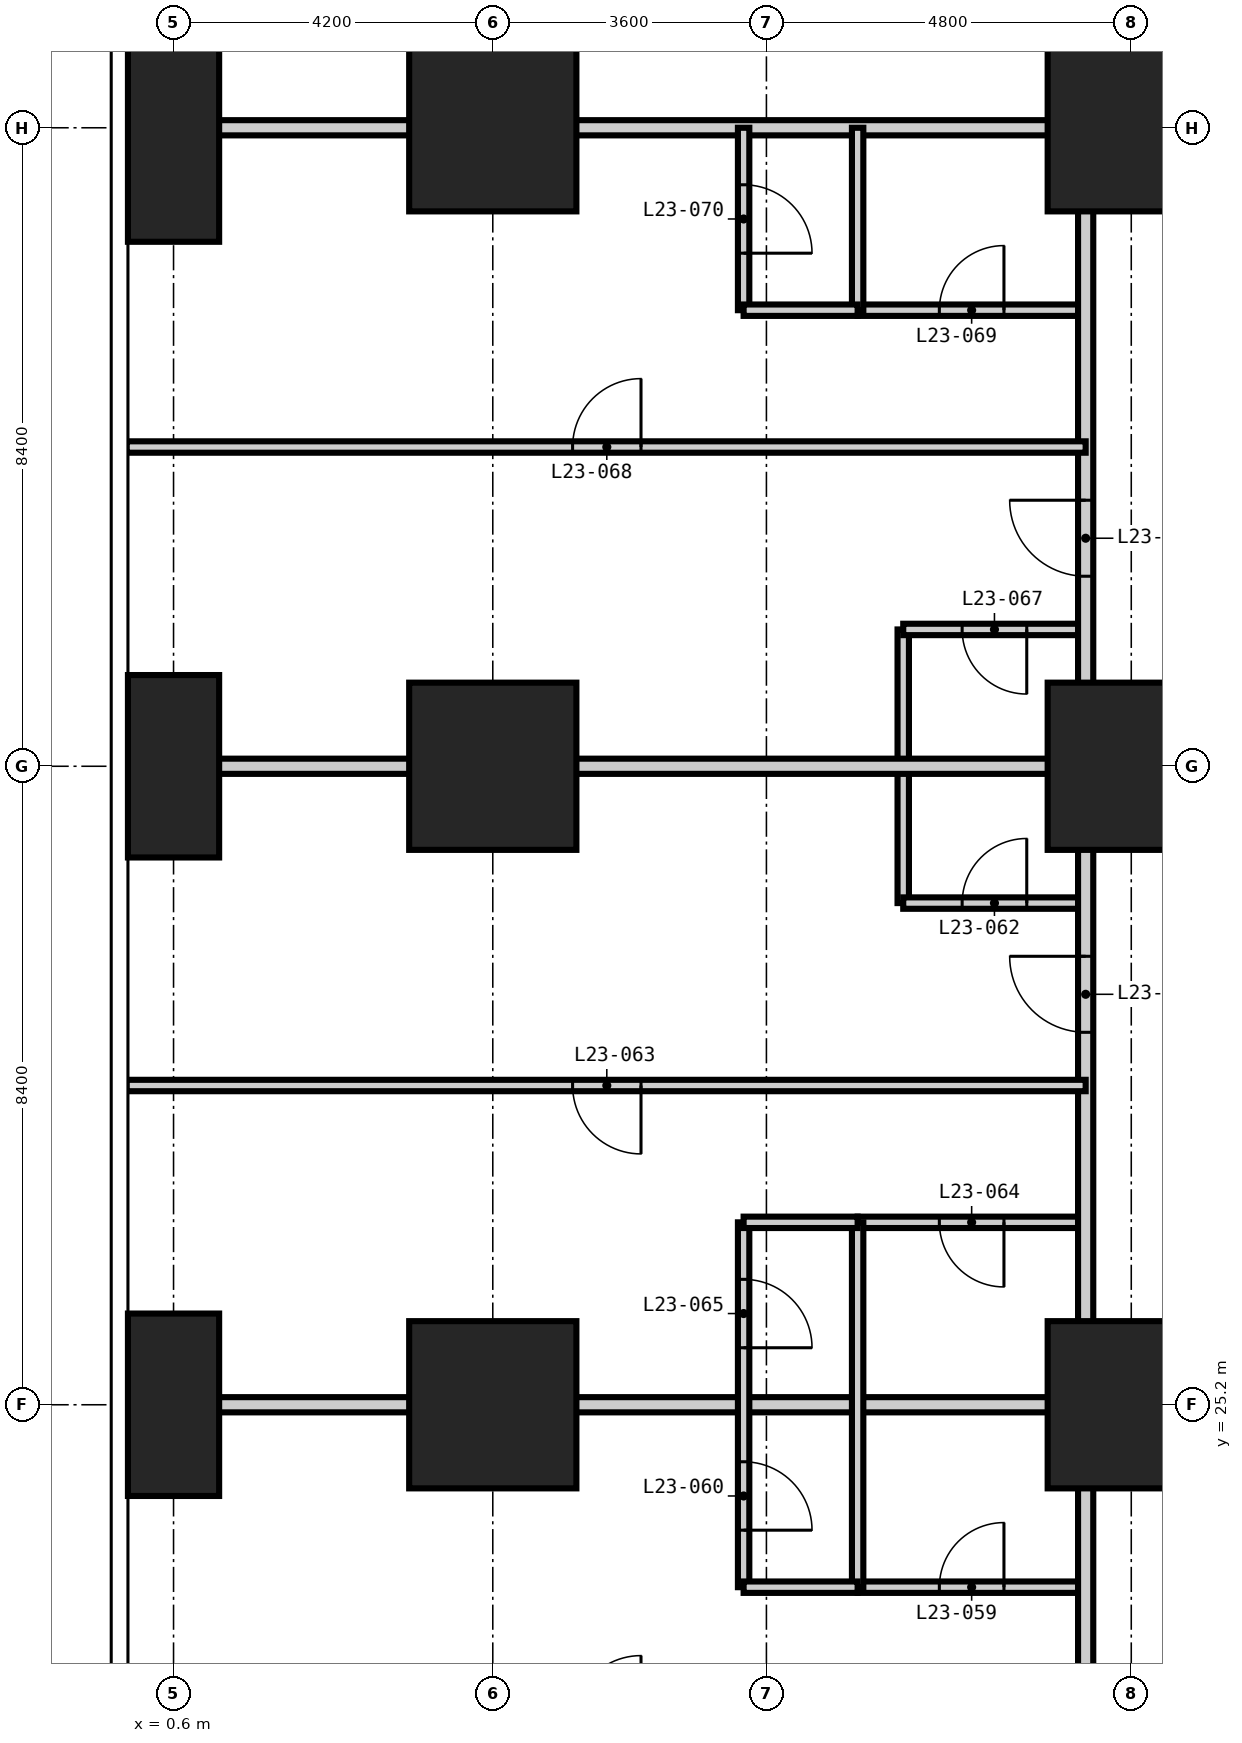
"""IFC4 building model, lengths in metres.
Left out: names, types, materials, properties, quantities, classifications, styles, units other than length and angle.
Written with IfcOpenShell. Run it as: python <this file> out.ifc"""

import sys

from ifc_helpers import new_model, si_unit, direction, frame, frame_2d, origin, origin_2d, place, context, subcontext, project, spatial, rectangle, extrude, element, fill, save


model = new_model("IFC4")
c1 = context("Model", 3, precision=1e-05, world=origin(), true_north=direction((0.0, 1.0)))
c2 = subcontext(c1, "Body", "Model", "MODEL_VIEW")
j1 = project(units=[si_unit("LENGTHUNIT", "METRE"), si_unit("PLANEANGLEUNIT", "RADIAN")], contexts=[c1])
p1 = place(None, origin())
s1 = spatial("IfcSite", under=j1, at=p1, CompositionType="ELEMENT")
p2 = place(p1, origin())
s2 = spatial("IfcBuilding", under=s1, at=p2, CompositionType="ELEMENT")
p3 = place(p2, frame((0.0, 0.0, 93.6)))
s3 = spatial("IfcBuildingStorey", under=s2, at=p3, CompositionType="ELEMENT", Elevation=93.6)
for number, where, z_axis, x_axis in (
    (1, (0.6, 25.2, -0.35), (0.0, 0.0, 1.0), (1.0, 0.0, 0.0)),
    (2, (0.6, 33.6, -0.35), (0.0, 0.0, 1.0), (1.0, 0.0, 0.0)),
):
    element("IfcColumn", number, at=place(p3, frame(where, z_axis=z_axis, x_axis=x_axis)), inside=s3, PredefinedType="COLUMN", context=c2, shape_type="SweptSolid", body=[
        extrude(rectangle(XDim=1.2, YDim=2.4, at=origin_2d()), origin(), (0.0, 0.0, 1.0), 3.6),
    ])
p4 = place(p3, frame((0.6, 42.0, -0.35), z_axis=(0.0, 0.0, 1.0), x_axis=(1.0, 0.0, 0.0)))
e3 = element("IfcColumn", 3, at=p4, inside=s3, PredefinedType="COLUMN", context=c2, shape_type="SweptSolid", body=[
    extrude(rectangle(XDim=1.2, YDim=3.0, at=origin_2d()), origin(), (0.0, 0.0, 1.0), 3.6),
])
for number, where, z_axis, x_axis in (
    (4, (4.8, 25.2, -0.35), (0.0, 0.0, 1.0), (1.0, 0.0, 0.0)),
    (5, (4.8, 33.6, -0.35), (0.0, 0.0, 1.0), (1.0, 0.0, 0.0)),
    (6, (4.8, 42.0, -0.35), (0.0, 0.0, 1.0), (1.0, 0.0, 0.0)),
    (7, (13.2, 25.2, -0.35), (0.0, 0.0, 1.0), (1.0, 0.0, 0.0)),
    (8, (13.2, 33.6, -0.35), (0.0, 0.0, 1.0), (1.0, 0.0, 0.0)),
    (9, (13.2, 42.0, -0.35), (0.0, 0.0, 1.0), (1.0, 0.0, 0.0)),
):
    element("IfcColumn", number, at=place(p3, frame(where, z_axis=z_axis, x_axis=x_axis)), inside=s3, PredefinedType="COLUMN", context=c2, shape_type="SweptSolid", body=[
        extrude(rectangle(XDim=2.2, YDim=2.2, at=origin_2d()), origin(), (0.0, 0.0, 1.0), 3.6),
    ])
p5 = place(p3, frame((10.2, 31.8, 0.0), z_axis=(0.0, 0.0, 1.0), x_axis=(0.0, 1.0, 0.0)))
e10 = element("IfcWall", 10, at=p5, inside=s3, PredefinedType="PARTITIONING", context=c2, shape_type="SweptSolid", body=[
    extrude(rectangle(XDim=3.6, YDim=0.15, at=frame_2d((1.8, 0.0))), origin(), (0.0, 0.0, 1.0), 3.25),
])
p6 = place(p3, frame((9.6, 22.8, 0.0), z_axis=(0.0, 0.0, 1.0), x_axis=(1.0, 0.0, 0.0)))
e11 = element("IfcWall", 11, at=p6, inside=s3, PredefinedType="PARTITIONING", context=c2, shape_type="SweptSolid", body=[
    extrude(rectangle(XDim=3.0, YDim=0.15, at=frame_2d((1.5, 0.0))), origin(), (0.0, 0.0, 1.0), 3.25),
])
p7 = place(p6, frame((1.075, 0.0, 0.0)))
e12 = element("IfcOpeningElement", 12, at=p7, cuts=e11, PredefinedType="OPENING", context=c2, shape_type="SweptSolid", body=[
    extrude(rectangle(XDim=0.85, YDim=2.1, at=frame_2d((0.425, 1.05))), frame((0.0, 0.085, 0.0), z_axis=(0.0, -1.0, 0.0), x_axis=(1.0, 0.0, 0.0)), (0.0, 0.0, 1.0), 0.17),
])
p8 = place(p3, frame((9.6, 27.6, 0.0), z_axis=(0.0, 0.0, 1.0), x_axis=(1.0, 0.0, 0.0)))
e13 = element("IfcWall", 13, at=p8, inside=s3, PredefinedType="PARTITIONING", context=c2, shape_type="SweptSolid", body=[
    extrude(rectangle(XDim=3.0, YDim=0.15, at=frame_2d((1.5, 0.0))), origin(), (0.0, 0.0, 1.0), 3.25),
])
p9 = place(p8, frame((1.075, 0.0, 0.0)))
e14 = element("IfcOpeningElement", 14, at=p9, cuts=e13, PredefinedType="OPENING", context=c2, shape_type="SweptSolid", body=[
    extrude(rectangle(XDim=0.85, YDim=2.1, at=frame_2d((0.425, 1.05))), frame((0.0, 0.085, 0.0), z_axis=(0.0, -1.0, 0.0), x_axis=(1.0, 0.0, 0.0)), (0.0, 0.0, 1.0), 0.17),
])
p10 = place(p3, frame((10.2, 31.8, 0.0), z_axis=(0.0, 0.0, 1.0), x_axis=(1.0, 0.0, 0.0)))
e15 = element("IfcWall", 15, at=p10, inside=s3, PredefinedType="PARTITIONING", context=c2, shape_type="SweptSolid", body=[
    extrude(rectangle(XDim=2.4, YDim=0.15, at=frame_2d((1.2, 0.0))), origin(), (0.0, 0.0, 1.0), 3.25),
])
p11 = place(p10, frame((0.775, 0.0, 0.0)))
e16 = element("IfcOpeningElement", 16, at=p11, cuts=e15, PredefinedType="OPENING", context=c2, shape_type="SweptSolid", body=[
    extrude(rectangle(XDim=0.85, YDim=2.1, at=frame_2d((0.425, 1.05))), frame((0.0, 0.085, 0.0), z_axis=(0.0, -1.0, 0.0), x_axis=(1.0, 0.0, 0.0)), (0.0, 0.0, 1.0), 0.17),
])
p12 = place(p3, frame((10.2, 35.4, 0.0), z_axis=(0.0, 0.0, 1.0), x_axis=(1.0, 0.0, 0.0)))
e17 = element("IfcWall", 17, at=p12, inside=s3, PredefinedType="PARTITIONING", context=c2, shape_type="SweptSolid", body=[
    extrude(rectangle(XDim=2.4, YDim=0.15, at=frame_2d((1.2, 0.0))), origin(), (0.0, 0.0, 1.0), 3.25),
])
p13 = place(p12, frame((0.775, 0.0, 0.0)))
e18 = element("IfcOpeningElement", 18, at=p13, cuts=e17, PredefinedType="OPENING", context=c2, shape_type="SweptSolid", body=[
    extrude(rectangle(XDim=0.85, YDim=2.1, at=frame_2d((0.425, 1.05))), frame((0.0, 0.085, 0.0), z_axis=(0.0, -1.0, 0.0), x_axis=(1.0, 0.0, 0.0)), (0.0, 0.0, 1.0), 0.17),
])
p14 = place(p3, frame((9.6, 39.6, 0.0), z_axis=(0.0, 0.0, 1.0), x_axis=(1.0, 0.0, 0.0)))
e19 = element("IfcWall", 19, at=p14, inside=s3, PredefinedType="PARTITIONING", context=c2, shape_type="SweptSolid", body=[
    extrude(rectangle(XDim=3.0, YDim=0.15, at=frame_2d((1.5, 0.0))), origin(), (0.0, 0.0, 1.0), 3.25),
])
p15 = place(p14, frame((1.075, 0.0, 0.0)))
e20 = element("IfcOpeningElement", 20, at=p15, cuts=e19, PredefinedType="OPENING", context=c2, shape_type="SweptSolid", body=[
    extrude(rectangle(XDim=0.85, YDim=2.1, at=frame_2d((0.425, 1.05))), frame((0.0, 0.085, 0.0), z_axis=(0.0, -1.0, 0.0), x_axis=(1.0, 0.0, 0.0)), (0.0, 0.0, 1.0), 0.17),
])
p16 = place(p3, frame((12.6, 13.1, 0.0), z_axis=(0.0, 0.0, 1.0), x_axis=(0.0, 1.0, 0.0)))
e21 = element("IfcWall", 21, at=p16, inside=s3, PredefinedType="PARTITIONING", context=c2, shape_type="SweptSolid", body=[
    extrude(rectangle(XDim=31.4, YDim=0.2, at=frame_2d((15.7, 0.0))), origin(), (0.0, 0.0, 1.0), 3.25),
])
p17 = place(p16, frame((6.2, 0.0, 0.0)))
e22 = element("IfcOpeningElement", 22, at=p17, cuts=e21, PredefinedType="OPENING", context=c2, shape_type="SweptSolid", body=[
    extrude(rectangle(XDim=1.0, YDim=2.2, at=frame_2d((0.5, 1.1))), frame((0.0, 0.11, 0.0), z_axis=(0.0, -1.0, 0.0), x_axis=(1.0, 0.0, 0.0)), (0.0, 0.0, 1.0), 0.22),
])
p18 = place(p16, frame((17.0, 0.0, 0.0)))
e23 = element("IfcOpeningElement", 23, at=p18, cuts=e21, PredefinedType="OPENING", context=c2, shape_type="SweptSolid", body=[
    extrude(rectangle(XDim=1.0, YDim=2.2, at=frame_2d((0.5, 1.1))), frame((0.0, 0.11, 0.0), z_axis=(0.0, -1.0, 0.0), x_axis=(1.0, 0.0, 0.0)), (0.0, 0.0, 1.0), 0.22),
])
p19 = place(p16, frame((23.0, 0.0, 0.0)))
e24 = element("IfcOpeningElement", 24, at=p19, cuts=e21, PredefinedType="OPENING", context=c2, shape_type="SweptSolid", body=[
    extrude(rectangle(XDim=1.0, YDim=2.2, at=frame_2d((0.5, 1.1))), frame((0.0, 0.11, 0.0), z_axis=(0.0, -1.0, 0.0), x_axis=(1.0, 0.0, 0.0)), (0.0, 0.0, 1.0), 0.22),
])
p20 = place(p16, frame((1.35, 0.0, 0.0)))
e25 = element("IfcOpeningElement", 25, at=p20, cuts=e21, PredefinedType="OPENING", context=c2, shape_type="SweptSolid", body=[
    extrude(rectangle(XDim=1.0, YDim=2.2, at=frame_2d((0.5, 1.1))), frame((0.0, 0.11, 0.0), z_axis=(0.0, -1.0, 0.0), x_axis=(1.0, 0.0, 0.0)), (0.0, 0.0, 1.0), 0.22),
])
p21 = place(p16, frame((30.05, 0.0, 0.0)))
e26 = element("IfcOpeningElement", 26, at=p21, cuts=e21, PredefinedType="OPENING", context=c2, shape_type="SweptSolid", body=[
    extrude(rectangle(XDim=1.0, YDim=2.2, at=frame_2d((0.5, 1.1))), frame((0.0, 0.11, 0.0), z_axis=(0.0, -1.0, 0.0), x_axis=(1.0, 0.0, 0.0)), (0.0, 0.0, 1.0), 0.22),
])
for number, where, z_axis, x_axis in (
    (27, (-0.018, 25.2, 0.0), (0.0, 0.0, 1.0), (1.0, 0.0, 0.0)),
    (28, (-0.018, 33.6, 0.0), (0.0, 0.0, 1.0), (1.0, 0.0, 0.0)),
    (29, (-0.018, 42.0, 0.0), (0.0, 0.0, 1.0), (1.0, 0.0, 0.0)),
):
    element("IfcWall", number, at=place(p3, frame(where, z_axis=z_axis, x_axis=x_axis)), inside=s3, PredefinedType="PARTITIONING", context=c2, shape_type="SweptSolid", body=[
        extrude(rectangle(XDim=12.618, YDim=0.2, at=frame_2d((6.309, 0.0))), origin(), (0.0, 0.0, 1.0), 3.25),
    ])
p22 = place(p3, frame((8.1, 22.8, 0.0), z_axis=(0.0, 0.0, 1.0), x_axis=(0.0, 1.0, 0.0)))
e30 = element("IfcWall", 30, at=p22, inside=s3, PredefinedType="PARTITIONING", context=c2, shape_type="SweptSolid", body=[
    extrude(rectangle(XDim=4.8, YDim=0.15, at=frame_2d((2.4, 0.0))), origin(), (0.0, 0.0, 1.0), 3.25),
])
p23 = place(p22, frame((0.75, 0.0, 0.0)))
e31 = element("IfcOpeningElement", 31, at=p23, cuts=e30, PredefinedType="OPENING", context=c2, shape_type="SweptSolid", body=[
    extrude(rectangle(XDim=0.9, YDim=2.1, at=frame_2d((0.45, 1.05))), frame((0.0, 0.085, 0.0), z_axis=(0.0, -1.0, 0.0), x_axis=(1.0, 0.0, 0.0)), (0.0, 0.0, 1.0), 0.17),
])
p24 = place(p22, frame((3.15, 0.0, 0.0)))
e32 = element("IfcOpeningElement", 32, at=p24, cuts=e30, PredefinedType="OPENING", context=c2, shape_type="SweptSolid", body=[
    extrude(rectangle(XDim=0.9, YDim=2.1, at=frame_2d((0.45, 1.05))), frame((0.0, 0.085, 0.0), z_axis=(0.0, -1.0, 0.0), x_axis=(1.0, 0.0, 0.0)), (0.0, 0.0, 1.0), 0.17),
])
p25 = place(p3, frame((8.1, 39.6, 0.0), z_axis=(0.0, 0.0, 1.0), x_axis=(0.0, 1.0, 0.0)))
e33 = element("IfcWall", 33, at=p25, inside=s3, PredefinedType="PARTITIONING", context=c2, shape_type="SweptSolid", body=[
    extrude(rectangle(XDim=2.4, YDim=0.15, at=frame_2d((1.2, 0.0))), origin(), (0.0, 0.0, 1.0), 3.25),
])
p26 = place(p25, frame((0.75, 0.0, 0.0)))
e34 = element("IfcOpeningElement", 34, at=p26, cuts=e33, PredefinedType="OPENING", context=c2, shape_type="SweptSolid", body=[
    extrude(rectangle(XDim=0.9, YDim=2.1, at=frame_2d((0.45, 1.05))), frame((0.0, 0.085, 0.0), z_axis=(0.0, -1.0, 0.0), x_axis=(1.0, 0.0, 0.0)), (0.0, 0.0, 1.0), 0.17),
])
p27 = place(p3, frame((9.6, 22.8, 0.0), z_axis=(0.0, 0.0, 1.0), x_axis=(0.0, 1.0, 0.0)))
e35 = element("IfcWall", 35, at=p27, inside=s3, PredefinedType="PARTITIONING", context=c2, shape_type="SweptSolid", body=[
    extrude(rectangle(XDim=4.8, YDim=0.15, at=frame_2d((2.4, 0.0))), origin(), (0.0, 0.0, 1.0), 3.25),
])
p28 = place(p3, frame((9.6, 39.6, 0.0), z_axis=(0.0, 0.0, 1.0), x_axis=(0.0, 1.0, 0.0)))
e36 = element("IfcWall", 36, at=p28, inside=s3, PredefinedType="PARTITIONING", context=c2, shape_type="SweptSolid", body=[
    extrude(rectangle(XDim=2.4, YDim=0.15, at=frame_2d((1.2, 0.0))), origin(), (0.0, 0.0, 1.0), 3.25),
])
for number, where, z_axis, x_axis in (
    (37, (8.1, 22.8, 0.0), (0.0, 0.0, 1.0), (1.0, 0.0, 0.0)),
    (38, (8.1, 27.6, 0.0), (0.0, 0.0, 1.0), (1.0, 0.0, 0.0)),
):
    element("IfcWall", number, at=place(p3, frame(where, z_axis=z_axis, x_axis=x_axis)), inside=s3, PredefinedType="PARTITIONING", context=c2, shape_type="SweptSolid", body=[
        extrude(rectangle(XDim=1.5, YDim=0.15, at=frame_2d((0.75, 0.0))), origin(), (0.0, 0.0, 1.0), 3.25),
    ])
p29 = place(p3, frame((-0.018, 29.4, 0.0), z_axis=(0.0, 0.0, 1.0), x_axis=(1.0, 0.0, 0.0)))
e39 = element("IfcWall", 39, at=p29, inside=s3, PredefinedType="PARTITIONING", context=c2, shape_type="SweptSolid", body=[
    extrude(rectangle(XDim=12.618, YDim=0.15, at=frame_2d((6.309, 0.0))), origin(), (0.0, 0.0, 1.0), 3.25),
])
p30 = place(p29, frame((5.868, 0.0, 0.0)))
e40 = element("IfcOpeningElement", 40, at=p30, cuts=e39, PredefinedType="OPENING", context=c2, shape_type="SweptSolid", body=[
    extrude(rectangle(XDim=0.9, YDim=2.1, at=frame_2d((0.45, 1.05))), frame((0.0, 0.085, 0.0), z_axis=(0.0, -1.0, 0.0), x_axis=(1.0, 0.0, 0.0)), (0.0, 0.0, 1.0), 0.17),
])
p31 = place(p3, frame((-0.018, 37.8, 0.0), z_axis=(0.0, 0.0, 1.0), x_axis=(1.0, 0.0, 0.0)))
e41 = element("IfcWall", 41, at=p31, inside=s3, PredefinedType="PARTITIONING", context=c2, shape_type="SweptSolid", body=[
    extrude(rectangle(XDim=12.618, YDim=0.15, at=frame_2d((6.309, 0.0))), origin(), (0.0, 0.0, 1.0), 3.25),
])
p32 = place(p31, frame((5.868, 0.0, 0.0)))
e42 = element("IfcOpeningElement", 42, at=p32, cuts=e41, PredefinedType="OPENING", context=c2, shape_type="SweptSolid", body=[
    extrude(rectangle(XDim=0.9, YDim=2.1, at=frame_2d((0.45, 1.05))), frame((0.0, 0.085, 0.0), z_axis=(0.0, -1.0, 0.0), x_axis=(1.0, 0.0, 0.0)), (0.0, 0.0, 1.0), 0.17),
])
p33 = place(p3, frame((8.1, 39.6, 0.0), z_axis=(0.0, 0.0, 1.0), x_axis=(1.0, 0.0, 0.0)))
e43 = element("IfcWall", 43, at=p33, inside=s3, PredefinedType="PARTITIONING", context=c2, shape_type="SweptSolid", body=[
    extrude(rectangle(XDim=1.5, YDim=0.15, at=frame_2d((0.75, 0.0))), origin(), (0.0, 0.0, 1.0), 3.25),
])
p34 = place(p7, origin())
e44 = element("IfcDoor", 44, at=p34, inside=s3, OperationType="SINGLE_SWING_RIGHT", PredefinedType="DOOR", context=c2, shape_type="SweptSolid", body=[
    extrude(rectangle(XDim=0.85, YDim=2.1, at=frame_2d((0.425, 1.05))), frame((0.0, 0.025, 0.0), z_axis=(0.0, -1.0, 0.0), x_axis=(1.0, 0.0, 0.0)), (0.0, 0.0, 1.0), 0.05),
])
fill(e12, e44)
p35 = place(p23, frame((0.9, 0.0, 0.0), z_axis=(0.0, 0.0, 1.0), x_axis=(-1.0, 0.0, 0.0)))
e45 = element("IfcDoor", 45, at=p35, inside=s3, OperationType="SINGLE_SWING_RIGHT", PredefinedType="DOOR", context=c2, shape_type="SweptSolid", body=[
    extrude(rectangle(XDim=0.9, YDim=2.1, at=frame_2d((0.45, 1.05))), frame((0.0, 0.025, 0.0), z_axis=(0.0, -1.0, 0.0), x_axis=(1.0, 0.0, 0.0)), (0.0, 0.0, 1.0), 0.05),
])
fill(e31, e45)
p36 = place(p18, origin())
e46 = element("IfcDoor", 46, at=p36, inside=s3, OperationType="SINGLE_SWING_RIGHT", PredefinedType="DOOR", context=c2, shape_type="SweptSolid", body=[
    extrude(rectangle(XDim=1.0, YDim=2.2, at=frame_2d((0.5, 1.1))), frame((0.0, 0.025, 0.0), z_axis=(0.0, -1.0, 0.0), x_axis=(1.0, 0.0, 0.0)), (0.0, 0.0, 1.0), 0.05),
])
fill(e23, e46)
p37 = place(p11, origin())
e47 = element("IfcDoor", 47, at=p37, inside=s3, OperationType="SINGLE_SWING_RIGHT", PredefinedType="DOOR", context=c2, shape_type="SweptSolid", body=[
    extrude(rectangle(XDim=0.85, YDim=2.1, at=frame_2d((0.425, 1.05))), frame((0.0, 0.025, 0.0), z_axis=(0.0, -1.0, 0.0), x_axis=(1.0, 0.0, 0.0)), (0.0, 0.0, 1.0), 0.05),
])
fill(e16, e47)
p38 = place(p30, frame((0.9, 0.0, 0.0), z_axis=(0.0, 0.0, 1.0), x_axis=(-1.0, 0.0, 0.0)))
e48 = element("IfcDoor", 48, at=p38, inside=s3, OperationType="SINGLE_SWING_LEFT", PredefinedType="DOOR", context=c2, shape_type="SweptSolid", body=[
    extrude(rectangle(XDim=0.9, YDim=2.1, at=frame_2d((0.45, 1.05))), frame((0.0, 0.025, 0.0), z_axis=(0.0, -1.0, 0.0), x_axis=(1.0, 0.0, 0.0)), (0.0, 0.0, 1.0), 0.05),
])
fill(e40, e48)
p39 = place(p9, frame((0.85, 0.0, 0.0), z_axis=(0.0, 0.0, 1.0), x_axis=(-1.0, 0.0, 0.0)))
e49 = element("IfcDoor", 49, at=p39, inside=s3, OperationType="SINGLE_SWING_LEFT", PredefinedType="DOOR", context=c2, shape_type="SweptSolid", body=[
    extrude(rectangle(XDim=0.85, YDim=2.1, at=frame_2d((0.425, 1.05))), frame((0.0, 0.025, 0.0), z_axis=(0.0, -1.0, 0.0), x_axis=(1.0, 0.0, 0.0)), (0.0, 0.0, 1.0), 0.05),
])
fill(e14, e49)
p40 = place(p24, frame((0.9, 0.0, 0.0), z_axis=(0.0, 0.0, 1.0), x_axis=(-1.0, 0.0, 0.0)))
e50 = element("IfcDoor", 50, at=p40, inside=s3, OperationType="SINGLE_SWING_RIGHT", PredefinedType="DOOR", context=c2, shape_type="SweptSolid", body=[
    extrude(rectangle(XDim=0.9, YDim=2.1, at=frame_2d((0.45, 1.05))), frame((0.0, 0.025, 0.0), z_axis=(0.0, -1.0, 0.0), x_axis=(1.0, 0.0, 0.0)), (0.0, 0.0, 1.0), 0.05),
])
fill(e32, e50)
p41 = place(p19, origin())
e51 = element("IfcDoor", 51, at=p41, inside=s3, OperationType="SINGLE_SWING_RIGHT", PredefinedType="DOOR", context=c2, shape_type="SweptSolid", body=[
    extrude(rectangle(XDim=1.0, YDim=2.2, at=frame_2d((0.5, 1.1))), frame((0.0, 0.025, 0.0), z_axis=(0.0, -1.0, 0.0), x_axis=(1.0, 0.0, 0.0)), (0.0, 0.0, 1.0), 0.05),
])
fill(e24, e51)
p42 = place(p13, frame((0.85, 0.0, 0.0), z_axis=(0.0, 0.0, 1.0), x_axis=(-1.0, 0.0, 0.0)))
e52 = element("IfcDoor", 52, at=p42, inside=s3, OperationType="SINGLE_SWING_LEFT", PredefinedType="DOOR", context=c2, shape_type="SweptSolid", body=[
    extrude(rectangle(XDim=0.85, YDim=2.1, at=frame_2d((0.425, 1.05))), frame((0.0, 0.025, 0.0), z_axis=(0.0, -1.0, 0.0), x_axis=(1.0, 0.0, 0.0)), (0.0, 0.0, 1.0), 0.05),
])
fill(e18, e52)
p43 = place(p32, origin())
e53 = element("IfcDoor", 53, at=p43, inside=s3, OperationType="SINGLE_SWING_RIGHT", PredefinedType="DOOR", context=c2, shape_type="SweptSolid", body=[
    extrude(rectangle(XDim=0.9, YDim=2.1, at=frame_2d((0.45, 1.05))), frame((0.0, 0.025, 0.0), z_axis=(0.0, -1.0, 0.0), x_axis=(1.0, 0.0, 0.0)), (0.0, 0.0, 1.0), 0.05),
])
fill(e42, e53)
p44 = place(p15, origin())
e54 = element("IfcDoor", 54, at=p44, inside=s3, OperationType="SINGLE_SWING_RIGHT", PredefinedType="DOOR", context=c2, shape_type="SweptSolid", body=[
    extrude(rectangle(XDim=0.85, YDim=2.1, at=frame_2d((0.425, 1.05))), frame((0.0, 0.025, 0.0), z_axis=(0.0, -1.0, 0.0), x_axis=(1.0, 0.0, 0.0)), (0.0, 0.0, 1.0), 0.05),
])
fill(e20, e54)
p45 = place(p26, frame((0.9, 0.0, 0.0), z_axis=(0.0, 0.0, 1.0), x_axis=(-1.0, 0.0, 0.0)))
e55 = element("IfcDoor", 55, at=p45, inside=s3, OperationType="SINGLE_SWING_RIGHT", PredefinedType="DOOR", context=c2, shape_type="SweptSolid", body=[
    extrude(rectangle(XDim=0.9, YDim=2.1, at=frame_2d((0.45, 1.05))), frame((0.0, 0.025, 0.0), z_axis=(0.0, -1.0, 0.0), x_axis=(1.0, 0.0, 0.0)), (0.0, 0.0, 1.0), 0.05),
])
fill(e34, e55)
save(model, sys.argv[1])
